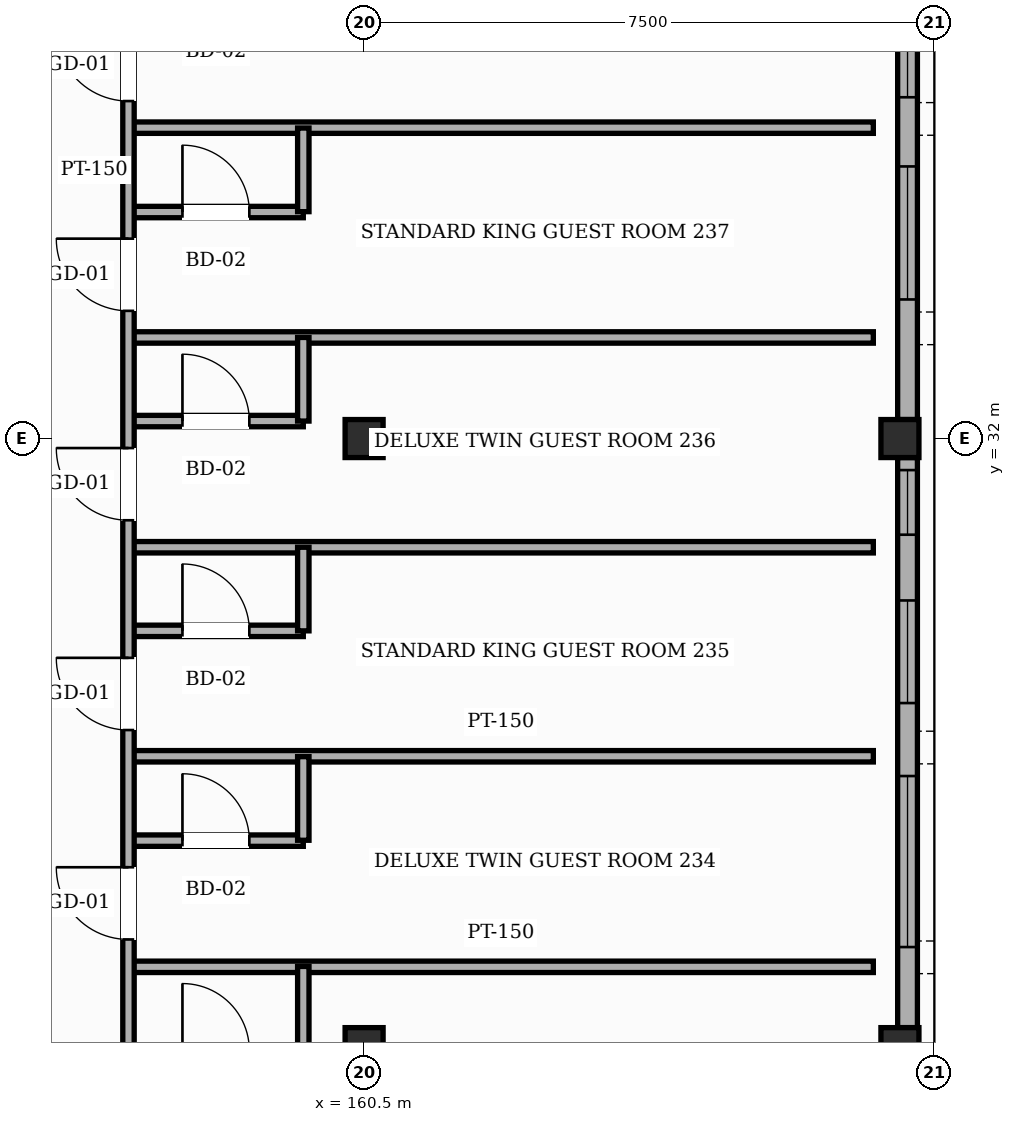
"""IFC4 building model, lengths in metres.
Left out: names, types, materials, properties, quantities, classifications, styles, units other than length and angle.
Written with IfcOpenShell. Run it as: python <this file> out.ifc"""

import sys

from ifc_helpers import new_model, si_unit, direction, frame, frame_2d, origin, origin_2d, place, context, subcontext, project, spatial, rectangle, hollow_rectangle, extrude, element, fill, save


model = new_model("IFC4")
c1 = context("Model", 3, precision=1e-05, world=origin(), true_north=direction((0.0, 1.0)))
c2 = subcontext(c1, "Body", "Model", "MODEL_VIEW")
j1 = project(units=[si_unit("LENGTHUNIT", "METRE"), si_unit("PLANEANGLEUNIT", "RADIAN")], contexts=[c1])
p1 = place(None, origin())
s1 = spatial("IfcSite", under=j1, at=p1, CompositionType="ELEMENT")
p2 = place(p1, origin())
s2 = spatial("IfcBuilding", under=s1, at=p2, CompositionType="ELEMENT")
p3 = place(p2, frame((0.0, 0.0, 35.4)))
s3 = spatial("IfcBuildingStorey", under=s2, at=p3, CompositionType="ELEMENT", Elevation=35.4)
for number, where, z_axis, x_axis in (
    (1, (160.5, 24.0, 0.0), (0.0, 0.0, 1.0), (1.0, 0.0, 0.0)),
    (2, (160.5, 32.0, 0.0), (0.0, 0.0, 1.0), (1.0, 0.0, 0.0)),
    (3, (167.55, 24.0, 0.0), (0.0, 0.0, 1.0), (1.0, 0.0, 0.0)),
    (4, (167.55, 32.0, 0.0), (0.0, 0.0, 1.0), (1.0, 0.0, 0.0)),
):
    element("IfcColumn", number, at=place(p3, frame(where, z_axis=z_axis, x_axis=x_axis)), inside=s3, PredefinedType="COLUMN", context=c2, shape_type="SweptSolid", body=[
        extrude(hollow_rectangle(XDim=0.5, YDim=0.5, WallThickness=0.022, InnerFilletRadius=0.022, OuterFilletRadius=0.044, at=origin_2d()), origin(), (0.0, 0.0, 1.0), 3.6),
    ])
p4 = place(p3, frame((167.65, 31.75, 0.0), z_axis=(0.0, 0.0, 1.0), x_axis=(0.0, -1.0, 0.0)))
e5 = element("IfcWall", 5, at=p4, inside=s3, PredefinedType="SOLIDWALL", context=c2, shape_type="SweptSolid", body=[
    extrude(rectangle(XDim=7.5, YDim=0.26, at=frame_2d((3.75, 0.0))), origin(), (0.0, 0.0, 1.0), 2.755),
])
p5 = place(p4, frame((4.19, 0.0, 0.85)))
e6 = element("IfcOpeningElement", 6, at=p5, cuts=e5, PredefinedType="OPENING", context=c2, shape_type="SweptSolid", body=[
    extrude(rectangle(XDim=2.25, YDim=1.65, at=frame_2d((1.125, 0.825))), frame((0.0, 0.14, 0.0), z_axis=(0.0, -1.0, 0.0), x_axis=(1.0, 0.0, 0.0)), (0.0, 0.0, 1.0), 0.28),
])
p6 = place(p4, frame((1.88, 0.0, 0.85)))
e7 = element("IfcOpeningElement", 7, at=p6, cuts=e5, PredefinedType="OPENING", context=c2, shape_type="SweptSolid", body=[
    extrude(rectangle(XDim=1.35, YDim=1.35, at=frame_2d((0.675, 0.675))), frame((0.0, 0.14, 0.0), z_axis=(0.0, -1.0, 0.0), x_axis=(1.0, 0.0, 0.0)), (0.0, 0.0, 1.0), 0.28),
])
p7 = place(p4, frame((0.165, 0.0, 0.85)))
e8 = element("IfcOpeningElement", 8, at=p7, cuts=e5, PredefinedType="OPENING", context=c2, shape_type="SweptSolid", body=[
    extrude(rectangle(XDim=0.85, YDim=1.35, at=frame_2d((0.425, 0.675))), frame((0.0, 0.14, 0.0), z_axis=(0.0, -1.0, 0.0), x_axis=(1.0, 0.0, 0.0)), (0.0, 0.0, 1.0), 0.28),
])
p8 = place(p3, frame((167.65, 40.65, 0.0), z_axis=(0.0, 0.0, 1.0), x_axis=(0.0, -1.0, 0.0)))
e9 = element("IfcWall", 9, at=p8, inside=s3, PredefinedType="SOLIDWALL", context=c2, shape_type="SweptSolid", body=[
    extrude(rectangle(XDim=8.4, YDim=0.26, at=frame_2d((4.2, 0.0))), origin(), (0.0, 0.0, 1.0), 2.755),
])
p9 = place(p8, frame((5.07, 0.0, 0.85)))
e10 = element("IfcOpeningElement", 10, at=p9, cuts=e9, PredefinedType="OPENING", context=c2, shape_type="SweptSolid", body=[
    extrude(rectangle(XDim=1.75, YDim=1.35, at=frame_2d((0.875, 0.675))), frame((0.0, 0.14, 0.0), z_axis=(0.0, -1.0, 0.0), x_axis=(1.0, 0.0, 0.0)), (0.0, 0.0, 1.0), 0.28),
])
p10 = place(p8, frame((2.21, 0.0, 0.85)))
e11 = element("IfcOpeningElement", 11, at=p10, cuts=e9, PredefinedType="OPENING", context=c2, shape_type="SweptSolid", body=[
    extrude(rectangle(XDim=1.95, YDim=1.35, at=frame_2d((0.975, 0.675))), frame((0.0, 0.14, 0.0), z_axis=(0.0, -1.0, 0.0), x_axis=(1.0, 0.0, 0.0)), (0.0, 0.0, 1.0), 0.28),
])
p11 = place(p8, frame((0.475, 0.0, 0.85)))
e12 = element("IfcOpeningElement", 12, at=p11, cuts=e9, PredefinedType="OPENING", context=c2, shape_type="SweptSolid", body=[
    extrude(rectangle(XDim=0.85, YDim=1.35, at=frame_2d((0.425, 0.675))), frame((0.0, 0.14, 0.0), z_axis=(0.0, -1.0, 0.0), x_axis=(1.0, 0.0, 0.0)), (0.0, 0.0, 1.0), 0.28),
])
p12 = place(p3, frame((157.4, 25.05, 0.0), z_axis=(0.0, 0.0, 1.0), x_axis=(1.0, 0.0, 0.0)))
e13 = element("IfcWall", 13, at=p12, inside=s3, PredefinedType="PARTITIONING", context=c2, shape_type="SweptSolid", body=[
    extrude(rectangle(XDim=9.8, YDim=0.15, at=frame_2d((4.9, 0.0))), origin(), (0.0, 0.0, 1.0), 3.365),
])
p13 = place(p3, frame((157.4, 26.71, 0.0), z_axis=(0.0, 0.0, 1.0), x_axis=(1.0, 0.0, 0.0)))
e14 = element("IfcWall", 14, at=p13, inside=s3, PredefinedType="PARTITIONING", context=c2, shape_type="SweptSolid", body=[
    extrude(rectangle(XDim=2.3, YDim=0.15, at=frame_2d((1.15, 0.0))), origin(), (0.0, 0.0, 1.0), 3.365),
])
p14 = place(p13, frame((0.71, 0.0, 0.0)))
e15 = element("IfcOpeningElement", 15, at=p14, cuts=e14, PredefinedType="OPENING", context=c2, shape_type="SweptSolid", body=[
    extrude(rectangle(XDim=0.88, YDim=2.12, at=frame_2d((0.44, 1.06))), frame((0.0, 0.085, 0.0), z_axis=(0.0, -1.0, 0.0), x_axis=(1.0, 0.0, 0.0)), (0.0, 0.0, 1.0), 0.17),
])
p15 = place(p3, frame((157.4, 27.82, 0.0), z_axis=(0.0, 0.0, 1.0), x_axis=(1.0, 0.0, 0.0)))
e16 = element("IfcWall", 16, at=p15, inside=s3, PredefinedType="PARTITIONING", context=c2, shape_type="SweptSolid", body=[
    extrude(rectangle(XDim=9.8, YDim=0.15, at=frame_2d((4.9, 0.0))), origin(), (0.0, 0.0, 1.0), 3.005),
])
p16 = place(p3, frame((157.4, 29.47, 0.0), z_axis=(0.0, 0.0, 1.0), x_axis=(1.0, 0.0, 0.0)))
e17 = element("IfcWall", 17, at=p16, inside=s3, PredefinedType="PARTITIONING", context=c2, shape_type="SweptSolid", body=[
    extrude(rectangle(XDim=2.3, YDim=0.15, at=frame_2d((1.15, 0.0))), origin(), (0.0, 0.0, 1.0), 3.365),
])
p17 = place(p16, frame((0.71, 0.0, 0.0)))
e18 = element("IfcOpeningElement", 18, at=p17, cuts=e17, PredefinedType="OPENING", context=c2, shape_type="SweptSolid", body=[
    extrude(rectangle(XDim=0.88, YDim=2.12, at=frame_2d((0.44, 1.06))), frame((0.0, 0.085, 0.0), z_axis=(0.0, -1.0, 0.0), x_axis=(1.0, 0.0, 0.0)), (0.0, 0.0, 1.0), 0.17),
])
p18 = place(p3, frame((157.4, 30.57, 0.0), z_axis=(0.0, 0.0, 1.0), x_axis=(1.0, 0.0, 0.0)))
e19 = element("IfcWall", 19, at=p18, inside=s3, PredefinedType="PARTITIONING", context=c2, shape_type="SweptSolid", body=[
    extrude(rectangle(XDim=9.8, YDim=0.15, at=frame_2d((4.9, 0.0))), origin(), (0.0, 0.0, 1.0), 3.365),
])
p19 = place(p3, frame((157.4, 32.23, 0.0), z_axis=(0.0, 0.0, 1.0), x_axis=(1.0, 0.0, 0.0)))
e20 = element("IfcWall", 20, at=p19, inside=s3, PredefinedType="PARTITIONING", context=c2, shape_type="SweptSolid", body=[
    extrude(rectangle(XDim=2.3, YDim=0.15, at=frame_2d((1.15, 0.0))), origin(), (0.0, 0.0, 1.0), 2.755),
])
p20 = place(p19, frame((0.71, 0.0, 0.0)))
e21 = element("IfcOpeningElement", 21, at=p20, cuts=e20, PredefinedType="OPENING", context=c2, shape_type="SweptSolid", body=[
    extrude(rectangle(XDim=0.88, YDim=2.12, at=frame_2d((0.44, 1.06))), frame((0.0, 0.085, 0.0), z_axis=(0.0, -1.0, 0.0), x_axis=(1.0, 0.0, 0.0)), (0.0, 0.0, 1.0), 0.17),
])
p21 = place(p3, frame((157.4, 33.33, 0.0), z_axis=(0.0, 0.0, 1.0), x_axis=(1.0, 0.0, 0.0)))
e22 = element("IfcWall", 22, at=p21, inside=s3, PredefinedType="PARTITIONING", context=c2, shape_type="SweptSolid", body=[
    extrude(rectangle(XDim=9.8, YDim=0.15, at=frame_2d((4.9, 0.0))), origin(), (0.0, 0.0, 1.0), 3.365),
])
p22 = place(p3, frame((157.4, 34.98, 0.0), z_axis=(0.0, 0.0, 1.0), x_axis=(1.0, 0.0, 0.0)))
e23 = element("IfcWall", 23, at=p22, inside=s3, PredefinedType="PARTITIONING", context=c2, shape_type="SweptSolid", body=[
    extrude(rectangle(XDim=2.3, YDim=0.15, at=frame_2d((1.15, 0.0))), origin(), (0.0, 0.0, 1.0), 3.365),
])
p23 = place(p22, frame((0.71, 0.0, 0.0)))
e24 = element("IfcOpeningElement", 24, at=p23, cuts=e23, PredefinedType="OPENING", context=c2, shape_type="SweptSolid", body=[
    extrude(rectangle(XDim=0.88, YDim=2.12, at=frame_2d((0.44, 1.06))), frame((0.0, 0.085, 0.0), z_axis=(0.0, -1.0, 0.0), x_axis=(1.0, 0.0, 0.0)), (0.0, 0.0, 1.0), 0.17),
])
p24 = place(p3, frame((157.4, 36.09, 0.0), z_axis=(0.0, 0.0, 1.0), x_axis=(1.0, 0.0, 0.0)))
e25 = element("IfcWall", 25, at=p24, inside=s3, PredefinedType="PARTITIONING", context=c2, shape_type="SweptSolid", body=[
    extrude(rectangle(XDim=9.8, YDim=0.15, at=frame_2d((4.9, 0.0))), origin(), (0.0, 0.0, 1.0), 3.365),
])
p25 = place(p3, frame((157.4, 22.3, 0.0), z_axis=(0.0, 0.0, 1.0), x_axis=(0.0, 1.0, 0.0)))
e26 = element("IfcWall", 26, at=p25, inside=s3, PredefinedType="PARTITIONING", context=c2, shape_type="SweptSolid", body=[
    extrude(rectangle(XDim=48.5, YDim=0.15, at=frame_2d((24.25, 0.0))), origin(), (0.0, 0.0, 1.0), 3.365),
])
p26 = place(p25, frame((24.875, 0.0, 0.0)))
e27 = element("IfcOpeningElement", 27, at=p26, cuts=e26, PredefinedType="OPENING", context=c2, shape_type="SweptSolid", body=[
    extrude(rectangle(XDim=1.65, YDim=2.35, at=frame_2d((0.825, 1.175))), frame((0.0, 0.085, 0.0), z_axis=(0.0, -1.0, 0.0), x_axis=(1.0, 0.0, 0.0)), (0.0, 0.0, 1.0), 0.17),
])
p27 = place(p25, frame((0.275, 0.0, 0.0)))
e28 = element("IfcOpeningElement", 28, at=p27, cuts=e26, PredefinedType="OPENING", context=c2, shape_type="SweptSolid", body=[
    extrude(rectangle(XDim=1.1, YDim=2.2, at=frame_2d((0.55, 1.1))), frame((0.0, 0.085, 0.0), z_axis=(0.0, -1.0, 0.0), x_axis=(1.0, 0.0, 0.0)), (0.0, 0.0, 1.0), 0.17),
])
p28 = place(p25, frame((3.11, 0.0, 0.0)))
e29 = element("IfcOpeningElement", 29, at=p28, cuts=e26, PredefinedType="OPENING", context=c2, shape_type="SweptSolid", body=[
    extrude(rectangle(XDim=0.95, YDim=2.15, at=frame_2d((0.475, 1.075))), frame((0.0, 0.085, 0.0), z_axis=(0.0, -1.0, 0.0), x_axis=(1.0, 0.0, 0.0)), (0.0, 0.0, 1.0), 0.17),
])
p29 = place(p25, frame((5.865, 0.0, 0.0)))
e30 = element("IfcOpeningElement", 30, at=p29, cuts=e26, PredefinedType="OPENING", context=c2, shape_type="SweptSolid", body=[
    extrude(rectangle(XDim=0.95, YDim=2.15, at=frame_2d((0.475, 1.075))), frame((0.0, 0.085, 0.0), z_axis=(0.0, -1.0, 0.0), x_axis=(1.0, 0.0, 0.0)), (0.0, 0.0, 1.0), 0.17),
])
p30 = place(p25, frame((8.625, 0.0, 0.0)))
e31 = element("IfcOpeningElement", 31, at=p30, cuts=e26, PredefinedType="OPENING", context=c2, shape_type="SweptSolid", body=[
    extrude(rectangle(XDim=0.95, YDim=2.15, at=frame_2d((0.475, 1.075))), frame((0.0, 0.085, 0.0), z_axis=(0.0, -1.0, 0.0), x_axis=(1.0, 0.0, 0.0)), (0.0, 0.0, 1.0), 0.17),
])
p31 = place(p25, frame((11.38, 0.0, 0.0)))
e32 = element("IfcOpeningElement", 32, at=p31, cuts=e26, PredefinedType="OPENING", context=c2, shape_type="SweptSolid", body=[
    extrude(rectangle(XDim=0.95, YDim=2.15, at=frame_2d((0.475, 1.075))), frame((0.0, 0.085, 0.0), z_axis=(0.0, -1.0, 0.0), x_axis=(1.0, 0.0, 0.0)), (0.0, 0.0, 1.0), 0.17),
])
p32 = place(p25, frame((14.14, 0.0, 0.0)))
e33 = element("IfcOpeningElement", 33, at=p32, cuts=e26, PredefinedType="OPENING", context=c2, shape_type="SweptSolid", body=[
    extrude(rectangle(XDim=0.95, YDim=2.15, at=frame_2d((0.475, 1.075))), frame((0.0, 0.085, 0.0), z_axis=(0.0, -1.0, 0.0), x_axis=(1.0, 0.0, 0.0)), (0.0, 0.0, 1.0), 0.17),
])
p33 = place(p25, frame((16.895, 0.0, 0.0)))
e34 = element("IfcOpeningElement", 34, at=p33, cuts=e26, PredefinedType="OPENING", context=c2, shape_type="SweptSolid", body=[
    extrude(rectangle(XDim=0.95, YDim=2.15, at=frame_2d((0.475, 1.075))), frame((0.0, 0.085, 0.0), z_axis=(0.0, -1.0, 0.0), x_axis=(1.0, 0.0, 0.0)), (0.0, 0.0, 1.0), 0.17),
])
p34 = place(p25, frame((32.37, 0.0, 0.0)))
e35 = element("IfcOpeningElement", 35, at=p34, cuts=e26, PredefinedType="OPENING", context=c2, shape_type="SweptSolid", body=[
    extrude(rectangle(XDim=1.1, YDim=2.2, at=frame_2d((0.55, 1.1))), frame((0.0, 0.085, 0.0), z_axis=(0.0, -1.0, 0.0), x_axis=(1.0, 0.0, 0.0)), (0.0, 0.0, 1.0), 0.17),
])
p35 = place(p25, frame((35.175, 0.0, 0.0)))
e36 = element("IfcOpeningElement", 36, at=p35, cuts=e26, PredefinedType="OPENING", context=c2, shape_type="SweptSolid", body=[
    extrude(rectangle(XDim=0.95, YDim=2.15, at=frame_2d((0.475, 1.075))), frame((0.0, 0.085, 0.0), z_axis=(0.0, -1.0, 0.0), x_axis=(1.0, 0.0, 0.0)), (0.0, 0.0, 1.0), 0.17),
])
p36 = place(p25, frame((37.91, 0.0, 0.0)))
e37 = element("IfcOpeningElement", 37, at=p36, cuts=e26, PredefinedType="OPENING", context=c2, shape_type="SweptSolid", body=[
    extrude(rectangle(XDim=0.95, YDim=2.15, at=frame_2d((0.475, 1.075))), frame((0.0, 0.085, 0.0), z_axis=(0.0, -1.0, 0.0), x_axis=(1.0, 0.0, 0.0)), (0.0, 0.0, 1.0), 0.17),
])
p37 = place(p25, frame((40.64, 0.0, 0.0)))
e38 = element("IfcOpeningElement", 38, at=p37, cuts=e26, PredefinedType="OPENING", context=c2, shape_type="SweptSolid", body=[
    extrude(rectangle(XDim=0.95, YDim=2.15, at=frame_2d((0.475, 1.075))), frame((0.0, 0.085, 0.0), z_axis=(0.0, -1.0, 0.0), x_axis=(1.0, 0.0, 0.0)), (0.0, 0.0, 1.0), 0.17),
])
p38 = place(p25, frame((43.375, 0.0, 0.0)))
e39 = element("IfcOpeningElement", 39, at=p38, cuts=e26, PredefinedType="OPENING", context=c2, shape_type="SweptSolid", body=[
    extrude(rectangle(XDim=0.95, YDim=2.15, at=frame_2d((0.475, 1.075))), frame((0.0, 0.085, 0.0), z_axis=(0.0, -1.0, 0.0), x_axis=(1.0, 0.0, 0.0)), (0.0, 0.0, 1.0), 0.17),
])
p39 = place(p25, frame((46.11, 0.0, 0.0)))
e40 = element("IfcOpeningElement", 40, at=p39, cuts=e26, PredefinedType="OPENING", context=c2, shape_type="SweptSolid", body=[
    extrude(rectangle(XDim=0.95, YDim=2.15, at=frame_2d((0.475, 1.075))), frame((0.0, 0.085, 0.0), z_axis=(0.0, -1.0, 0.0), x_axis=(1.0, 0.0, 0.0)), (0.0, 0.0, 1.0), 0.17),
])
for number, where, z_axis, x_axis in (
    (41, (159.7, 23.955, 0.0), (0.0, 0.0, 1.0), (0.0, 1.0, 0.0)),
    (42, (159.7, 26.715, 0.0), (0.0, 0.0, 1.0), (0.0, 1.0, 0.0)),
):
    element("IfcWall", number, at=place(p3, frame(where, z_axis=z_axis, x_axis=x_axis)), inside=s3, PredefinedType="PARTITIONING", context=c2, shape_type="SweptSolid", body=[
        extrude(rectangle(XDim=1.1, YDim=0.15, at=frame_2d((0.55, 0.0))), origin(), (0.0, 0.0, 1.0), 3.365),
    ])
for number, where, z_axis, x_axis in (
    (43, (159.7, 29.47, 0.0), (0.0, 0.0, 1.0), (0.0, 1.0, 0.0)),
    (44, (159.7, 32.23, 0.0), (0.0, 0.0, 1.0), (0.0, 1.0, 0.0)),
):
    element("IfcWall", number, at=place(p3, frame(where, z_axis=z_axis, x_axis=x_axis)), inside=s3, PredefinedType="PARTITIONING", context=c2, shape_type="SweptSolid", body=[
        extrude(rectangle(XDim=1.1, YDim=0.15, at=frame_2d((0.55, 0.0))), origin(), (0.0, 0.0, 1.0), 3.365),
    ])
p40 = place(p3, frame((159.7, 34.985, 0.0), z_axis=(0.0, 0.0, 1.0), x_axis=(0.0, 1.0, 0.0)))
e45 = element("IfcWall", 45, at=p40, inside=s3, PredefinedType="PARTITIONING", context=c2, shape_type="SweptSolid", body=[
    extrude(rectangle(XDim=1.1, YDim=0.15, at=frame_2d((0.55, 0.0))), origin(), (0.0, 0.0, 1.0), 3.365),
])
p41 = place(p5, origin())
e46 = element("IfcWindow", 46, at=p41, inside=s3, PartitioningType="SINGLE_PANEL", PredefinedType="WINDOW", context=c2, shape_type="SweptSolid", body=[
    extrude(rectangle(XDim=2.25, YDim=1.65, at=frame_2d((1.125, 0.825))), frame((0.0, 0.03, 0.0), z_axis=(0.0, -1.0, 0.0), x_axis=(1.0, 0.0, 0.0)), (0.0, 0.0, 1.0), 0.06),
])
fill(e6, e46)
p42 = place(p6, origin())
e47 = element("IfcWindow", 47, at=p42, inside=s3, PartitioningType="SINGLE_PANEL", PredefinedType="WINDOW", context=c2, shape_type="SweptSolid", body=[
    extrude(rectangle(XDim=1.35, YDim=1.35, at=frame_2d((0.675, 0.675))), frame((0.0, 0.03, 0.0), z_axis=(0.0, -1.0, 0.0), x_axis=(1.0, 0.0, 0.0)), (0.0, 0.0, 1.0), 0.06),
])
fill(e7, e47)
p43 = place(p7, origin())
e48 = element("IfcWindow", 48, at=p43, inside=s3, PartitioningType="SINGLE_PANEL", PredefinedType="WINDOW", context=c2, shape_type="SweptSolid", body=[
    extrude(rectangle(XDim=0.85, YDim=1.35, at=frame_2d((0.425, 0.675))), frame((0.0, 0.03, 0.0), z_axis=(0.0, -1.0, 0.0), x_axis=(1.0, 0.0, 0.0)), (0.0, 0.0, 1.0), 0.06),
])
fill(e8, e48)
p44 = place(p9, origin())
e49 = element("IfcWindow", 49, at=p44, inside=s3, PartitioningType="SINGLE_PANEL", PredefinedType="WINDOW", context=c2, shape_type="SweptSolid", body=[
    extrude(rectangle(XDim=1.75, YDim=1.35, at=frame_2d((0.875, 0.675))), frame((0.0, 0.03, 0.0), z_axis=(0.0, -1.0, 0.0), x_axis=(1.0, 0.0, 0.0)), (0.0, 0.0, 1.0), 0.06),
])
fill(e10, e49)
p45 = place(p10, origin())
e50 = element("IfcWindow", 50, at=p45, inside=s3, PartitioningType="SINGLE_PANEL", PredefinedType="WINDOW", context=c2, shape_type="SweptSolid", body=[
    extrude(rectangle(XDim=1.95, YDim=1.35, at=frame_2d((0.975, 0.675))), frame((0.0, 0.03, 0.0), z_axis=(0.0, -1.0, 0.0), x_axis=(1.0, 0.0, 0.0)), (0.0, 0.0, 1.0), 0.06),
])
fill(e11, e50)
p46 = place(p28, origin())
e51 = element("IfcDoor", 51, at=p46, inside=s3, OperationType="SINGLE_SWING_RIGHT", PredefinedType="DOOR", context=c2, shape_type="SweptSolid", body=[
    extrude(rectangle(XDim=0.95, YDim=2.15, at=frame_2d((0.475, 1.075))), frame((0.0, 0.025, 0.0), z_axis=(0.0, -1.0, 0.0), x_axis=(1.0, 0.0, 0.0)), (0.0, 0.0, 1.0), 0.05),
])
fill(e29, e51)
p47 = place(p14, origin())
e52 = element("IfcDoor", 52, at=p47, inside=s3, OperationType="SINGLE_SWING_LEFT", PredefinedType="DOOR", context=c2, shape_type="SweptSolid", body=[
    extrude(rectangle(XDim=0.88, YDim=2.12, at=frame_2d((0.44, 1.06))), frame((0.0, 0.025, 0.0), z_axis=(0.0, -1.0, 0.0), x_axis=(1.0, 0.0, 0.0)), (0.0, 0.0, 1.0), 0.05),
])
fill(e15, e52)
p48 = place(p29, origin())
e53 = element("IfcDoor", 53, at=p48, inside=s3, OperationType="SINGLE_SWING_RIGHT", PredefinedType="DOOR", context=c2, shape_type="SweptSolid", body=[
    extrude(rectangle(XDim=0.95, YDim=2.15, at=frame_2d((0.475, 1.075))), frame((0.0, 0.025, 0.0), z_axis=(0.0, -1.0, 0.0), x_axis=(1.0, 0.0, 0.0)), (0.0, 0.0, 1.0), 0.05),
])
fill(e30, e53)
p49 = place(p17, origin())
e54 = element("IfcDoor", 54, at=p49, inside=s3, OperationType="SINGLE_SWING_LEFT", PredefinedType="DOOR", context=c2, shape_type="SweptSolid", body=[
    extrude(rectangle(XDim=0.88, YDim=2.12, at=frame_2d((0.44, 1.06))), frame((0.0, 0.025, 0.0), z_axis=(0.0, -1.0, 0.0), x_axis=(1.0, 0.0, 0.0)), (0.0, 0.0, 1.0), 0.05),
])
fill(e18, e54)
p50 = place(p30, origin())
e55 = element("IfcDoor", 55, at=p50, inside=s3, OperationType="SINGLE_SWING_RIGHT", PredefinedType="DOOR", context=c2, shape_type="SweptSolid", body=[
    extrude(rectangle(XDim=0.95, YDim=2.15, at=frame_2d((0.475, 1.075))), frame((0.0, 0.025, 0.0), z_axis=(0.0, -1.0, 0.0), x_axis=(1.0, 0.0, 0.0)), (0.0, 0.0, 1.0), 0.05),
])
fill(e31, e55)
p51 = place(p20, origin())
e56 = element("IfcDoor", 56, at=p51, inside=s3, OperationType="SINGLE_SWING_LEFT", PredefinedType="DOOR", context=c2, shape_type="SweptSolid", body=[
    extrude(rectangle(XDim=0.88, YDim=2.12, at=frame_2d((0.44, 1.06))), frame((0.0, 0.025, 0.0), z_axis=(0.0, -1.0, 0.0), x_axis=(1.0, 0.0, 0.0)), (0.0, 0.0, 1.0), 0.05),
])
fill(e21, e56)
p52 = place(p31, origin())
e57 = element("IfcDoor", 57, at=p52, inside=s3, OperationType="SINGLE_SWING_RIGHT", PredefinedType="DOOR", context=c2, shape_type="SweptSolid", body=[
    extrude(rectangle(XDim=0.95, YDim=2.15, at=frame_2d((0.475, 1.075))), frame((0.0, 0.025, 0.0), z_axis=(0.0, -1.0, 0.0), x_axis=(1.0, 0.0, 0.0)), (0.0, 0.0, 1.0), 0.05),
])
fill(e32, e57)
p53 = place(p23, origin())
e58 = element("IfcDoor", 58, at=p53, inside=s3, OperationType="SINGLE_SWING_LEFT", PredefinedType="DOOR", context=c2, shape_type="SweptSolid", body=[
    extrude(rectangle(XDim=0.88, YDim=2.12, at=frame_2d((0.44, 1.06))), frame((0.0, 0.025, 0.0), z_axis=(0.0, -1.0, 0.0), x_axis=(1.0, 0.0, 0.0)), (0.0, 0.0, 1.0), 0.05),
])
fill(e24, e58)
p54 = place(p32, origin())
e59 = element("IfcDoor", 59, at=p54, inside=s3, OperationType="SINGLE_SWING_RIGHT", PredefinedType="DOOR", context=c2, shape_type="SweptSolid", body=[
    extrude(rectangle(XDim=0.95, YDim=2.15, at=frame_2d((0.475, 1.075))), frame((0.0, 0.025, 0.0), z_axis=(0.0, -1.0, 0.0), x_axis=(1.0, 0.0, 0.0)), (0.0, 0.0, 1.0), 0.05),
])
fill(e33, e59)
save(model, sys.argv[1])
